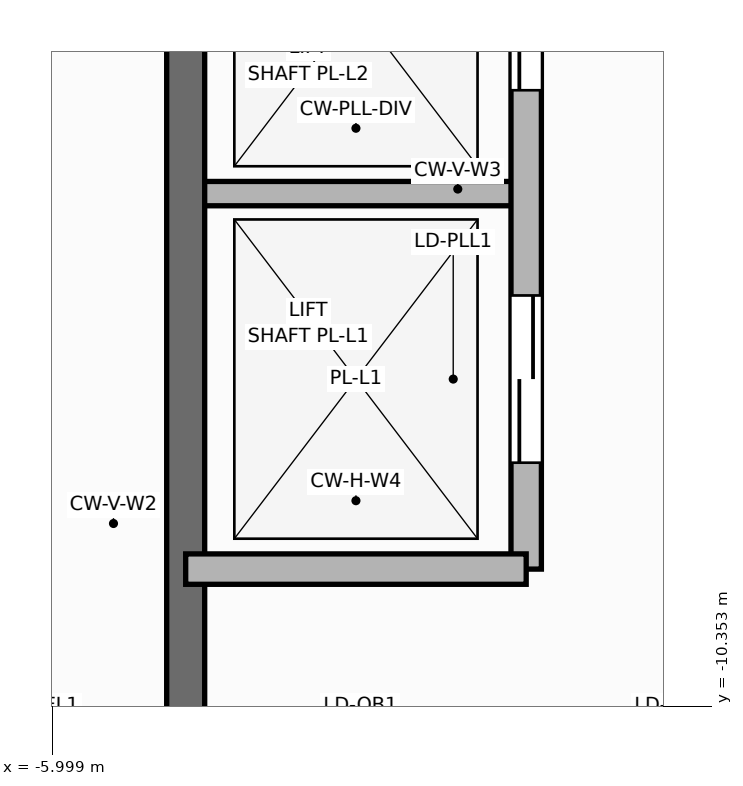
"""IFC4 building model, lengths in metres.
Left out: names, types, materials, properties, quantities, classifications, styles, units other than length and angle.
Written with IfcOpenShell. Run it as: python <this file> out.ifc"""

import sys

from ifc_helpers import new_model, si_unit, direction, frame, frame_2d, origin, place, context, subcontext, project, spatial, rectangle, extrude, element, fill, save


model = new_model("IFC4")
c1 = context("Model", 3, precision=1e-05, world=origin(), true_north=direction((0.0, 1.0)))
c2 = subcontext(c1, "Body", "Model", "MODEL_VIEW")
j1 = project(units=[si_unit("LENGTHUNIT", "METRE"), si_unit("PLANEANGLEUNIT", "RADIAN")], contexts=[c1])
p1 = place(None, origin())
s1 = spatial("IfcSite", under=j1, at=p1, CompositionType="ELEMENT")
p2 = place(p1, origin())
s2 = spatial("IfcBuilding", under=s1, at=p2, CompositionType="ELEMENT")
p3 = place(p2, origin())
s3 = spatial("IfcBuildingStorey", under=s2, at=p3, CompositionType="ELEMENT", Elevation=0.0)
p4 = place(p3, frame((-23.245, -11.24, -0.015), z_axis=(0.0, 0.0, 1.0), x_axis=(0.616945483616, 0.787005889588, 0.0)))
e1 = element("IfcWall", 1, at=p4, inside=s3, PredefinedType="STANDARD", context=c2, shape_type="SweptSolid", body=[
    extrude(rectangle(XDim=28.627, YDim=0.28, at=frame_2d((14.314, 0.0))), origin(), (0.0, 0.0, 1.0), 3.91),
])
p5 = place(p3, frame((-5.12, -6.98, 0.0), z_axis=(0.0, 0.0, 1.0), x_axis=(1.0, 0.0, 0.0)))
e2 = element("IfcWall", 2, at=p5, inside=s3, PredefinedType="PARTITIONING", context=c2, shape_type="SweptSolid", body=[
    extrude(rectangle(XDim=2.24, YDim=0.16, at=frame_2d((1.12, 0.0))), origin(), (0.0, 0.0, 1.0), 5.12),
])
p6 = place(p3, frame((-5.12, -13.85, 0.0), z_axis=(0.0, 0.0, 1.0), x_axis=(0.0, 1.0, 0.0)))
e3 = element("IfcWall", 3, at=p6, inside=s3, PredefinedType="SHEAR", context=c2, shape_type="SweptSolid", body=[
    extrude(rectangle(XDim=9.4, YDim=0.25, at=frame_2d((4.7, 0.0))), origin(), (0.0, 0.0, 1.0), 5.4),
])
p7 = place(p3, frame((-2.88, -9.45, 0.0), z_axis=(0.0, 0.0, 1.0), x_axis=(0.0, 1.0, 0.0)))
e4 = element("IfcWall", 4, at=p7, inside=s3, PredefinedType="SOLIDWALL", context=c2, shape_type="SweptSolid", body=[
    extrude(rectangle(XDim=5.0, YDim=0.2, at=frame_2d((2.5, 0.0))), origin(), (0.0, 0.0, 1.0), 5.12),
])
p8 = place(p7, frame((0.7, 0.0, 0.0)))
e5 = element("IfcOpeningElement", 5, at=p8, cuts=e4, PredefinedType="OPENING", context=c2, shape_type="SweptSolid", body=[
    extrude(rectangle(XDim=1.106, YDim=2.104, at=frame_2d((0.55, 1.052))), frame((0.0, 0.11, 0.0), z_axis=(0.0, -1.0, 0.0), x_axis=(1.0, 0.0, 0.0)), (0.0, 0.0, 1.0), 0.22),
])
p9 = place(p7, frame((3.15, 0.0, 0.0)))
e6 = element("IfcOpeningElement", 6, at=p9, cuts=e4, PredefinedType="OPENING", context=c2, shape_type="SweptSolid", body=[
    extrude(rectangle(XDim=1.106, YDim=2.104, at=frame_2d((0.55, 1.052))), frame((0.0, 0.11, 0.0), z_axis=(0.0, -1.0, 0.0), x_axis=(1.0, 0.0, 0.0)), (0.0, 0.0, 1.0), 0.22),
])
p10 = place(p3, frame((-5.12, -9.45, 0.0), z_axis=(0.0, 0.0, 1.0), x_axis=(1.0, 0.0, 0.0)))
e7 = element("IfcWall", 7, at=p10, inside=s3, PredefinedType="SOLIDWALL", context=c2, shape_type="SweptSolid", body=[
    extrude(rectangle(XDim=2.24, YDim=0.2, at=frame_2d((1.12, 0.0))), origin(), (0.0, 0.0, 1.0), 5.12),
])
p11 = place(p8, origin())
e8 = element("IfcDoor", 8, at=p11, inside=s3, OperationType="DOUBLE_DOOR_SLIDING", PredefinedType="DOOR", context=c2, shape_type="SweptSolid", body=[
    extrude(rectangle(XDim=1.1, YDim=2.1, at=frame_2d((0.55, 1.05))), frame((0.0, 0.025, 0.0), z_axis=(0.0, -1.0, 0.0), x_axis=(1.0, 0.0, 0.0)), (0.0, 0.0, 1.0), 0.05),
])
fill(e5, e8)
p12 = place(p9, origin())
e9 = element("IfcDoor", 9, at=p12, inside=s3, OperationType="DOUBLE_DOOR_SLIDING", PredefinedType="DOOR", context=c2, shape_type="SweptSolid", body=[
    extrude(rectangle(XDim=1.1, YDim=2.1, at=frame_2d((0.55, 1.05))), frame((0.0, 0.025, 0.0), z_axis=(0.0, -1.0, 0.0), x_axis=(1.0, 0.0, 0.0)), (0.0, 0.0, 1.0), 0.05),
])
fill(e6, e9)
save(model, sys.argv[1])
